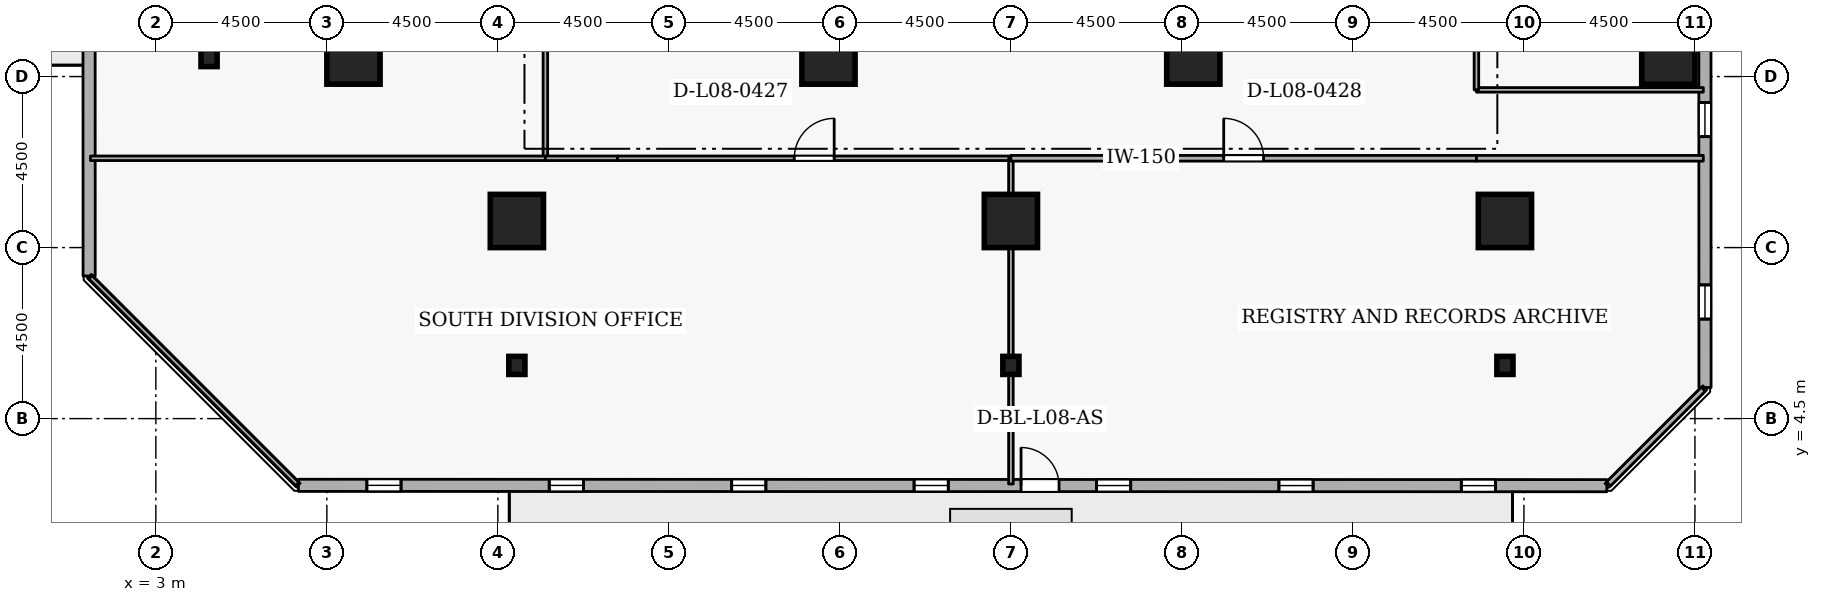
"""IFC4 building model, lengths in metres.
Left out: names, types, materials, properties, quantities, classifications, styles, units other than length and angle.
Written with IfcOpenShell. Run it as: python <this file> out.ifc"""

import sys

from ifc_helpers import new_model, si_unit, direction, frame, frame_2d, origin, origin_2d, place, context, subcontext, project, spatial, rectangle, i_section, extrude, element, fill, save


model = new_model("IFC4")
c1 = context("Model", 3, precision=1e-05, world=origin(), true_north=direction((0.0, 1.0)))
c2 = subcontext(c1, "Body", "Model", "MODEL_VIEW")
j1 = project(units=[si_unit("LENGTHUNIT", "METRE"), si_unit("PLANEANGLEUNIT", "RADIAN")], contexts=[c1])
p1 = place(None, origin())
s1 = spatial("IfcSite", under=j1, at=p1, CompositionType="ELEMENT")
p2 = place(p1, origin())
s2 = spatial("IfcBuilding", under=s1, at=p2, CompositionType="ELEMENT")
p3 = place(p2, frame((0.0, 0.0, 35.1)))
s3 = spatial("IfcBuildingStorey", under=s2, at=p3, CompositionType="ELEMENT", Elevation=35.1)
for number, where, z_axis, x_axis in (
    (1, (12.5, 9.7, 0.0), (0.0, 0.0, 1.0), (1.0, 0.0, 0.0)),
    (2, (25.5, 9.7, 0.0), (0.0, 0.0, 1.0), (1.0, 0.0, 0.0)),
    (3, (38.5, 9.7, 0.0), (0.0, 0.0, 1.0), (1.0, 0.0, 0.0)),
    (4, (42.8, 14.0, 0.0), (0.0, 0.0, 1.0), (1.0, 0.0, 0.0)),
    (5, (8.2, 14.0, 0.0), (0.0, 0.0, 1.0), (1.0, 0.0, 0.0)),
    (6, (20.7, 14.0, 0.0), (0.0, 0.0, 1.0), (1.0, 0.0, 0.0)),
    (7, (30.3, 14.0, 0.0), (0.0, 0.0, 1.0), (1.0, 0.0, 0.0)),
):
    element("IfcColumn", number, at=place(p3, frame(where, z_axis=z_axis, x_axis=x_axis)), inside=s3, PredefinedType="COLUMN", context=c2, shape_type="SweptSolid", body=[
        extrude(rectangle(XDim=1.4, YDim=1.4, at=origin_2d()), origin(), (0.0, 0.0, 1.0), 3.6),
    ])
for number, where, z_axis, x_axis in (
    (8, (12.5, 5.9, 0.0), (0.0, 0.0, 1.0), (1.0, 0.0, 0.0)),
    (9, (25.5, 5.9, 0.0), (0.0, 0.0, 1.0), (1.0, 0.0, 0.0)),
    (10, (38.5, 5.9, 0.0), (0.0, 0.0, 1.0), (1.0, 0.0, 0.0)),
    (11, (4.4, 14.0, 0.0), (0.0, 0.0, 1.0), (1.0, 0.0, 0.0)),
):
    element("IfcColumn", number, at=place(p3, frame(where, z_axis=z_axis, x_axis=x_axis)), inside=s3, PredefinedType="COLUMN", context=c2, shape_type="SweptSolid", body=[
        extrude(i_section(OverallWidth=0.424, OverallDepth=0.475, WebThickness=0.048, FlangeThickness=0.077, FilletRadius=0.015, at=origin_2d()), origin(), (0.0, 0.0, 1.0), 3.6),
    ])
p4 = place(p3, frame((6.752, 2.745, 0.0), z_axis=(0.0, 0.0, 1.0), x_axis=(0.999999961759, -0.000276554545, 0.0)))
e12 = element("IfcWall", 12, at=p4, inside=s3, PredefinedType="STANDARD", context=c2, shape_type="SweptSolid", body=[
    extrude(rectangle(XDim=34.429, YDim=0.32, at=frame_2d((17.214, 0.0))), origin(), (0.0, 0.0, 1.0), 2.7),
])
p5 = place(p4, frame((19.014, 0.0, 0.0)))
e13 = element("IfcOpeningElement", 13, at=p5, cuts=e12, PredefinedType="OPENING", context=c2, shape_type="SweptSolid", body=[
    extrude(rectangle(XDim=1.0, YDim=2.08, at=frame_2d((0.5, 1.04))), frame((0.0, 0.17, 0.0), z_axis=(0.0, -1.0, 0.0), x_axis=(1.0, 0.0, 0.0)), (0.0, 0.0, 1.0), 0.34),
])
p6 = place(p4, frame((1.8, 0.0, 0.72)))
e14 = element("IfcOpeningElement", 14, at=p6, cuts=e12, PredefinedType="OPENING", context=c2, shape_type="SweptSolid", body=[
    extrude(rectangle(XDim=0.9, YDim=1.75, at=frame_2d((0.45, 0.875))), frame((0.0, 0.17, 0.0), z_axis=(0.0, -1.0, 0.0), x_axis=(1.0, 0.0, 0.0)), (0.0, 0.0, 1.0), 0.34),
])
p7 = place(p4, frame((6.6, 0.0, 0.72)))
e15 = element("IfcOpeningElement", 15, at=p7, cuts=e12, PredefinedType="OPENING", context=c2, shape_type="SweptSolid", body=[
    extrude(rectangle(XDim=0.9, YDim=1.75, at=frame_2d((0.45, 0.875))), frame((0.0, 0.17, 0.0), z_axis=(0.0, -1.0, 0.0), x_axis=(1.0, 0.0, 0.0)), (0.0, 0.0, 1.0), 0.34),
])
p8 = place(p4, frame((11.4, 0.0, 0.72)))
e16 = element("IfcOpeningElement", 16, at=p8, cuts=e12, PredefinedType="OPENING", context=c2, shape_type="SweptSolid", body=[
    extrude(rectangle(XDim=0.9, YDim=1.75, at=frame_2d((0.45, 0.875))), frame((0.0, 0.17, 0.0), z_axis=(0.0, -1.0, 0.0), x_axis=(1.0, 0.0, 0.0)), (0.0, 0.0, 1.0), 0.34),
])
p9 = place(p4, frame((16.2, 0.0, 0.72)))
e17 = element("IfcOpeningElement", 17, at=p9, cuts=e12, PredefinedType="OPENING", context=c2, shape_type="SweptSolid", body=[
    extrude(rectangle(XDim=0.9, YDim=1.75, at=frame_2d((0.45, 0.875))), frame((0.0, 0.17, 0.0), z_axis=(0.0, -1.0, 0.0), x_axis=(1.0, 0.0, 0.0)), (0.0, 0.0, 1.0), 0.34),
])
p10 = place(p4, frame((21.0, 0.0, 0.72)))
e18 = element("IfcOpeningElement", 18, at=p10, cuts=e12, PredefinedType="OPENING", context=c2, shape_type="SweptSolid", body=[
    extrude(rectangle(XDim=0.9, YDim=1.75, at=frame_2d((0.45, 0.875))), frame((0.0, 0.17, 0.0), z_axis=(0.0, -1.0, 0.0), x_axis=(1.0, 0.0, 0.0)), (0.0, 0.0, 1.0), 0.34),
])
p11 = place(p4, frame((25.8, 0.0, 0.72)))
e19 = element("IfcOpeningElement", 19, at=p11, cuts=e12, PredefinedType="OPENING", context=c2, shape_type="SweptSolid", body=[
    extrude(rectangle(XDim=0.9, YDim=1.75, at=frame_2d((0.45, 0.875))), frame((0.0, 0.17, 0.0), z_axis=(0.0, -1.0, 0.0), x_axis=(1.0, 0.0, 0.0)), (0.0, 0.0, 1.0), 0.34),
])
p12 = place(p4, frame((30.6, 0.0, 0.72)))
e20 = element("IfcOpeningElement", 20, at=p12, cuts=e12, PredefinedType="OPENING", context=c2, shape_type="SweptSolid", body=[
    extrude(rectangle(XDim=0.9, YDim=1.75, at=frame_2d((0.45, 0.875))), frame((0.0, 0.17, 0.0), z_axis=(0.0, -1.0, 0.0), x_axis=(1.0, 0.0, 0.0)), (0.0, 0.0, 1.0), 0.34),
])
p13 = place(p3, frame((43.765, 5.319, 0.0), z_axis=(0.0, 0.0, 1.0), x_axis=(-0.000276554545, 0.999999961759, 0.0)))
e21 = element("IfcWall", 21, at=p13, inside=s3, PredefinedType="STANDARD", context=c2, shape_type="SweptSolid", body=[
    extrude(rectangle(XDim=34.429, YDim=0.32, at=frame_2d((17.214, 0.0))), origin(), (0.0, 0.0, 1.0), 2.7),
])
p14 = place(p13, frame((1.8, 0.0, 0.72)))
e22 = element("IfcOpeningElement", 22, at=p14, cuts=e21, PredefinedType="OPENING", context=c2, shape_type="SweptSolid", body=[
    extrude(rectangle(XDim=0.9, YDim=1.75, at=frame_2d((0.45, 0.875))), frame((0.0, 0.17, 0.0), z_axis=(0.0, -1.0, 0.0), x_axis=(1.0, 0.0, 0.0)), (0.0, 0.0, 1.0), 0.34),
])
p15 = place(p13, frame((6.6, 0.0, 0.72)))
e23 = element("IfcOpeningElement", 23, at=p15, cuts=e21, PredefinedType="OPENING", context=c2, shape_type="SweptSolid", body=[
    extrude(rectangle(XDim=0.9, YDim=1.75, at=frame_2d((0.45, 0.875))), frame((0.0, 0.17, 0.0), z_axis=(0.0, -1.0, 0.0), x_axis=(1.0, 0.0, 0.0)), (0.0, 0.0, 1.0), 0.34),
])
p16 = place(p13, frame((11.4, 0.0, 0.72)))
e24 = element("IfcOpeningElement", 24, at=p16, cuts=e21, PredefinedType="OPENING", context=c2, shape_type="SweptSolid", body=[
    extrude(rectangle(XDim=0.9, YDim=1.75, at=frame_2d((0.45, 0.875))), frame((0.0, 0.17, 0.0), z_axis=(0.0, -1.0, 0.0), x_axis=(1.0, 0.0, 0.0)), (0.0, 0.0, 1.0), 0.34),
])
p17 = place(p13, frame((16.2, 0.0, 0.72)))
e25 = element("IfcOpeningElement", 25, at=p17, cuts=e21, PredefinedType="OPENING", context=c2, shape_type="SweptSolid", body=[
    extrude(rectangle(XDim=0.9, YDim=1.75, at=frame_2d((0.45, 0.875))), frame((0.0, 0.17, 0.0), z_axis=(0.0, -1.0, 0.0), x_axis=(1.0, 0.0, 0.0)), (0.0, 0.0, 1.0), 0.34),
])
p18 = place(p13, frame((25.8, 0.0, 0.72)))
e26 = element("IfcOpeningElement", 26, at=p18, cuts=e21, PredefinedType="OPENING", context=c2, shape_type="SweptSolid", body=[
    extrude(rectangle(XDim=0.9, YDim=1.75, at=frame_2d((0.45, 0.875))), frame((0.0, 0.17, 0.0), z_axis=(0.0, -1.0, 0.0), x_axis=(1.0, 0.0, 0.0)), (0.0, 0.0, 1.0), 0.34),
])
p19 = place(p13, frame((30.6, 0.0, 0.72)))
e27 = element("IfcOpeningElement", 27, at=p19, cuts=e21, PredefinedType="OPENING", context=c2, shape_type="SweptSolid", body=[
    extrude(rectangle(XDim=0.9, YDim=1.75, at=frame_2d((0.45, 0.875))), frame((0.0, 0.17, 0.0), z_axis=(0.0, -1.0, 0.0), x_axis=(1.0, 0.0, 0.0)), (0.0, 0.0, 1.0), 0.34),
])
p20 = place(p3, frame((1.235, 42.681, 0.0), z_axis=(0.0, 0.0, 1.0), x_axis=(0.000276554545, -0.999999961759, 0.0)))
e28 = element("IfcWall", 28, at=p20, inside=s3, PredefinedType="STANDARD", context=c2, shape_type="SweptSolid", body=[
    extrude(rectangle(XDim=34.429, YDim=0.32, at=frame_2d((17.214, 0.0))), origin(), (0.0, 0.0, 1.0), 2.7),
])
p21 = place(p20, frame((19.014, 0.0, 0.0)))
e29 = element("IfcOpeningElement", 29, at=p21, cuts=e28, PredefinedType="OPENING", context=c2, shape_type="SweptSolid", body=[
    extrude(rectangle(XDim=1.0, YDim=2.08, at=frame_2d((0.5, 1.04))), frame((0.0, 0.17, 0.0), z_axis=(0.0, -1.0, 0.0), x_axis=(1.0, 0.0, 0.0)), (0.0, 0.0, 1.0), 0.34),
])
p22 = place(p20, frame((1.8, 0.0, 0.72)))
e30 = element("IfcOpeningElement", 30, at=p22, cuts=e28, PredefinedType="OPENING", context=c2, shape_type="SweptSolid", body=[
    extrude(rectangle(XDim=0.9, YDim=1.75, at=frame_2d((0.45, 0.875))), frame((0.0, 0.17, 0.0), z_axis=(0.0, -1.0, 0.0), x_axis=(1.0, 0.0, 0.0)), (0.0, 0.0, 1.0), 0.34),
])
p23 = place(p20, frame((6.6, 0.0, 0.72)))
e31 = element("IfcOpeningElement", 31, at=p23, cuts=e28, PredefinedType="OPENING", context=c2, shape_type="SweptSolid", body=[
    extrude(rectangle(XDim=0.9, YDim=1.75, at=frame_2d((0.45, 0.875))), frame((0.0, 0.17, 0.0), z_axis=(0.0, -1.0, 0.0), x_axis=(1.0, 0.0, 0.0)), (0.0, 0.0, 1.0), 0.34),
])
p24 = place(p20, frame((11.4, 0.0, 0.72)))
e32 = element("IfcOpeningElement", 32, at=p24, cuts=e28, PredefinedType="OPENING", context=c2, shape_type="SweptSolid", body=[
    extrude(rectangle(XDim=0.9, YDim=1.75, at=frame_2d((0.45, 0.875))), frame((0.0, 0.17, 0.0), z_axis=(0.0, -1.0, 0.0), x_axis=(1.0, 0.0, 0.0)), (0.0, 0.0, 1.0), 0.34),
])
p25 = place(p20, frame((16.2, 0.0, 0.72)))
e33 = element("IfcOpeningElement", 33, at=p25, cuts=e28, PredefinedType="OPENING", context=c2, shape_type="SweptSolid", body=[
    extrude(rectangle(XDim=0.9, YDim=1.75, at=frame_2d((0.45, 0.875))), frame((0.0, 0.17, 0.0), z_axis=(0.0, -1.0, 0.0), x_axis=(1.0, 0.0, 0.0)), (0.0, 0.0, 1.0), 0.34),
])
p26 = place(p20, frame((21.0, 0.0, 0.72)))
e34 = element("IfcOpeningElement", 34, at=p26, cuts=e28, PredefinedType="OPENING", context=c2, shape_type="SweptSolid", body=[
    extrude(rectangle(XDim=0.9, YDim=1.75, at=frame_2d((0.45, 0.875))), frame((0.0, 0.17, 0.0), z_axis=(0.0, -1.0, 0.0), x_axis=(1.0, 0.0, 0.0)), (0.0, 0.0, 1.0), 0.34),
])
p27 = place(p20, frame((25.8, 0.0, 0.72)))
e35 = element("IfcOpeningElement", 35, at=p27, cuts=e28, PredefinedType="OPENING", context=c2, shape_type="SweptSolid", body=[
    extrude(rectangle(XDim=0.9, YDim=1.75, at=frame_2d((0.45, 0.875))), frame((0.0, 0.17, 0.0), z_axis=(0.0, -1.0, 0.0), x_axis=(1.0, 0.0, 0.0)), (0.0, 0.0, 1.0), 0.34),
])
p28 = place(p3, frame((13.25, 20.7, 0.0), z_axis=(0.0, 0.0, 1.0), x_axis=(0.0, -1.0, 0.0)))
e36 = element("IfcWall", 36, at=p28, inside=s3, PredefinedType="PARTITIONING", context=c2, shape_type="SweptSolid", body=[
    extrude(rectangle(XDim=9.35, YDim=0.12, at=frame_2d((4.675, 0.0))), origin(), (0.0, 0.0, 1.0), 3.34),
])
p29 = place(p28, frame((4.15, 0.0, 0.0)))
e37 = element("IfcOpeningElement", 37, at=p29, cuts=e36, PredefinedType="OPENING", context=c2, shape_type="SweptSolid", body=[
    extrude(rectangle(XDim=1.05, YDim=2.1, at=frame_2d((0.525, 1.05))), frame((0.0, 0.07, 0.0), z_axis=(0.0, -1.0, 0.0), x_axis=(1.0, 0.0, 0.0)), (0.0, 0.0, 1.0), 0.14),
])
p30 = place(p3, frame((13.25, 11.35, 0.0), z_axis=(0.0, 0.0, 1.0), x_axis=(-1.0, 0.0, 0.0)))
e38 = element("IfcWall", 38, at=p30, inside=s3, PredefinedType="PARTITIONING", context=c2, shape_type="SweptSolid", body=[
    extrude(rectangle(XDim=11.97, YDim=0.12, at=frame_2d((5.985, 0.0))), origin(), (0.0, 0.0, 1.0), 3.34),
])
p31 = place(p3, frame((43.72, 13.15, 0.0), z_axis=(0.0, 0.0, 1.0), x_axis=(-1.0, 0.0, 0.0)))
e39 = element("IfcWall", 39, at=p31, inside=s3, PredefinedType="PARTITIONING", context=c2, shape_type="SweptSolid", body=[
    extrude(rectangle(XDim=5.97, YDim=0.12, at=frame_2d((2.985, 0.0))), origin(), (0.0, 0.0, 1.0), 3.34),
])
p32 = place(p3, frame((37.75, 13.15, 0.0), z_axis=(0.0, 0.0, 1.0), x_axis=(0.0, 1.0, 0.0)))
e40 = element("IfcWall", 40, at=p32, inside=s3, PredefinedType="PARTITIONING", context=c2, shape_type="SweptSolid", body=[
    extrude(rectangle(XDim=1.862, YDim=0.12, at=frame_2d((0.931, 0.0))), origin(), (0.0, 0.0, 1.0), 3.34),
])
p33 = place(p3, frame((6.719, 2.78, 0.0), z_axis=(0.0, 0.0, 1.0), x_axis=(-0.707106781187, 0.707106781187, 0.0)))
e41 = element("IfcWall", 41, at=p33, inside=s3, PredefinedType="PARTITIONING", context=c2, shape_type="SweptSolid", body=[
    extrude(rectangle(XDim=7.693, YDim=0.12, at=frame_2d((3.846, 0.0))), origin(), (0.0, 0.0, 1.0), 3.34),
])
p34 = place(p3, frame((13.25, 11.35, 0.0), z_axis=(0.0, 0.0, 1.0), x_axis=(1.0, 0.0, 0.0)))
e42 = element("IfcWall", 42, at=p34, inside=s3, PredefinedType="PARTITIONING", context=c2, shape_type="SweptSolid", body=[
    extrude(rectangle(XDim=1.9, YDim=0.12, at=frame_2d((0.95, 0.0))), origin(), (0.0, 0.0, 1.0), 3.34),
])
p35 = place(p3, frame((15.15, 11.35, 0.0), z_axis=(0.0, 0.0, 1.0), x_axis=(1.0, 0.0, 0.0)))
e43 = element("IfcWall", 43, at=p35, inside=s3, PredefinedType="PARTITIONING", context=c2, shape_type="SweptSolid", body=[
    extrude(rectangle(XDim=10.35, YDim=0.12, at=frame_2d((5.175, 0.0))), origin(), (0.0, 0.0, 1.0), 3.34),
])
p36 = place(p35, frame((4.65, 0.0, 0.0)))
e44 = element("IfcOpeningElement", 44, at=p36, cuts=e43, PredefinedType="OPENING", context=c2, shape_type="SweptSolid", body=[
    extrude(rectangle(XDim=1.05, YDim=2.1, at=frame_2d((0.525, 1.05))), frame((0.0, 0.07, 0.0), z_axis=(0.0, -1.0, 0.0), x_axis=(1.0, 0.0, 0.0)), (0.0, 0.0, 1.0), 0.14),
])
p37 = place(p3, frame((25.5, 11.35, 0.0), z_axis=(0.0, 0.0, 1.0), x_axis=(0.0, -1.0, 0.0)))
e45 = element("IfcWall", 45, at=p37, inside=s3, PredefinedType="PARTITIONING", context=c2, shape_type="SweptSolid", body=[
    extrude(rectangle(XDim=8.57, YDim=0.12, at=frame_2d((4.285, 0.0))), origin(), (0.0, 0.0, 1.0), 2.878),
])
p38 = place(p3, frame((25.5, 11.35, 0.0), z_axis=(0.0, 0.0, 1.0), x_axis=(1.0, 0.0, 0.0)))
e46 = element("IfcWall", 46, at=p38, inside=s3, PredefinedType="PARTITIONING", context=c2, shape_type="SweptSolid", body=[
    extrude(rectangle(XDim=12.25, YDim=0.15, at=frame_2d((6.125, 0.0))), origin(), (0.0, 0.0, 1.0), 3.34),
])
p39 = place(p38, frame((5.6, 0.0, 0.0)))
e47 = element("IfcOpeningElement", 47, at=p39, cuts=e46, PredefinedType="OPENING", context=c2, shape_type="SweptSolid", body=[
    extrude(rectangle(XDim=1.05, YDim=2.1, at=frame_2d((0.525, 1.05))), frame((0.0, 0.085, 0.0), z_axis=(0.0, -1.0, 0.0), x_axis=(1.0, 0.0, 0.0)), (0.0, 0.0, 1.0), 0.17),
])
p40 = place(p3, frame((37.75, 11.35, 0.0), z_axis=(0.0, 0.0, 1.0), x_axis=(1.0, 0.0, 0.0)))
e48 = element("IfcWall", 48, at=p40, inside=s3, PredefinedType="PARTITIONING", context=c2, shape_type="SweptSolid", body=[
    extrude(rectangle(XDim=5.97, YDim=0.15, at=frame_2d((2.985, 0.0))), origin(), (0.0, 0.0, 1.0), 3.34),
])
p41 = place(p3, frame((43.72, 5.275, 0.0), z_axis=(0.0, 0.0, 1.0), x_axis=(-0.707106781187, -0.707106781187, 0.0)))
e49 = element("IfcWall", 49, at=p41, inside=s3, PredefinedType="PARTITIONING", context=c2, shape_type="SweptSolid", body=[
    extrude(rectangle(XDim=3.528, YDim=0.15, at=frame_2d((1.764, 0.0))), origin(), (0.0, 0.0, 1.0), 3.34),
])
p42 = place(p5, origin())
e50 = element("IfcDoor", 50, at=p42, inside=s3, OperationType="SINGLE_SWING_LEFT", PredefinedType="DOOR", context=c2, shape_type="SweptSolid", body=[
    extrude(rectangle(XDim=1.0, YDim=2.08, at=frame_2d((0.5, 1.04))), frame((0.0, 0.025, 0.0), z_axis=(0.0, -1.0, 0.0), x_axis=(1.0, 0.0, 0.0)), (0.0, 0.0, 1.0), 0.05),
])
fill(e13, e50)
p43 = place(p6, origin())
e51 = element("IfcWindow", 51, at=p43, inside=s3, PartitioningType="SINGLE_PANEL", PredefinedType="WINDOW", context=c2, shape_type="SweptSolid", body=[
    extrude(rectangle(XDim=0.9, YDim=1.75, at=frame_2d((0.45, 0.875))), frame((0.0, 0.03, 0.0), z_axis=(0.0, -1.0, 0.0), x_axis=(1.0, 0.0, 0.0)), (0.0, 0.0, 1.0), 0.06),
])
fill(e14, e51)
p44 = place(p7, origin())
e52 = element("IfcWindow", 52, at=p44, inside=s3, PartitioningType="SINGLE_PANEL", PredefinedType="WINDOW", context=c2, shape_type="SweptSolid", body=[
    extrude(rectangle(XDim=0.9, YDim=1.75, at=frame_2d((0.45, 0.875))), frame((0.0, 0.03, 0.0), z_axis=(0.0, -1.0, 0.0), x_axis=(1.0, 0.0, 0.0)), (0.0, 0.0, 1.0), 0.06),
])
fill(e15, e52)
p45 = place(p8, origin())
e53 = element("IfcWindow", 53, at=p45, inside=s3, PartitioningType="SINGLE_PANEL", PredefinedType="WINDOW", context=c2, shape_type="SweptSolid", body=[
    extrude(rectangle(XDim=0.9, YDim=1.75, at=frame_2d((0.45, 0.875))), frame((0.0, 0.03, 0.0), z_axis=(0.0, -1.0, 0.0), x_axis=(1.0, 0.0, 0.0)), (0.0, 0.0, 1.0), 0.06),
])
fill(e16, e53)
p46 = place(p9, origin())
e54 = element("IfcWindow", 54, at=p46, inside=s3, PartitioningType="SINGLE_PANEL", PredefinedType="WINDOW", context=c2, shape_type="SweptSolid", body=[
    extrude(rectangle(XDim=0.9, YDim=1.75, at=frame_2d((0.45, 0.875))), frame((0.0, 0.03, 0.0), z_axis=(0.0, -1.0, 0.0), x_axis=(1.0, 0.0, 0.0)), (0.0, 0.0, 1.0), 0.06),
])
fill(e17, e54)
p47 = place(p10, origin())
e55 = element("IfcWindow", 55, at=p47, inside=s3, PartitioningType="SINGLE_PANEL", PredefinedType="WINDOW", context=c2, shape_type="SweptSolid", body=[
    extrude(rectangle(XDim=0.9, YDim=1.75, at=frame_2d((0.45, 0.875))), frame((0.0, 0.03, 0.0), z_axis=(0.0, -1.0, 0.0), x_axis=(1.0, 0.0, 0.0)), (0.0, 0.0, 1.0), 0.06),
])
fill(e18, e55)
p48 = place(p11, origin())
e56 = element("IfcWindow", 56, at=p48, inside=s3, PartitioningType="SINGLE_PANEL", PredefinedType="WINDOW", context=c2, shape_type="SweptSolid", body=[
    extrude(rectangle(XDim=0.9, YDim=1.75, at=frame_2d((0.45, 0.875))), frame((0.0, 0.03, 0.0), z_axis=(0.0, -1.0, 0.0), x_axis=(1.0, 0.0, 0.0)), (0.0, 0.0, 1.0), 0.06),
])
fill(e19, e56)
p49 = place(p12, origin())
e57 = element("IfcWindow", 57, at=p49, inside=s3, PartitioningType="SINGLE_PANEL", PredefinedType="WINDOW", context=c2, shape_type="SweptSolid", body=[
    extrude(rectangle(XDim=0.9, YDim=1.75, at=frame_2d((0.45, 0.875))), frame((0.0, 0.03, 0.0), z_axis=(0.0, -1.0, 0.0), x_axis=(1.0, 0.0, 0.0)), (0.0, 0.0, 1.0), 0.06),
])
fill(e20, e57)
p50 = place(p14, origin())
e58 = element("IfcWindow", 58, at=p50, inside=s3, PartitioningType="SINGLE_PANEL", PredefinedType="WINDOW", context=c2, shape_type="SweptSolid", body=[
    extrude(rectangle(XDim=0.9, YDim=1.75, at=frame_2d((0.45, 0.875))), frame((0.0, 0.03, 0.0), z_axis=(0.0, -1.0, 0.0), x_axis=(1.0, 0.0, 0.0)), (0.0, 0.0, 1.0), 0.06),
])
fill(e22, e58)
p51 = place(p15, origin())
e59 = element("IfcWindow", 59, at=p51, inside=s3, PartitioningType="SINGLE_PANEL", PredefinedType="WINDOW", context=c2, shape_type="SweptSolid", body=[
    extrude(rectangle(XDim=0.9, YDim=1.75, at=frame_2d((0.45, 0.875))), frame((0.0, 0.03, 0.0), z_axis=(0.0, -1.0, 0.0), x_axis=(1.0, 0.0, 0.0)), (0.0, 0.0, 1.0), 0.06),
])
fill(e23, e59)
p52 = place(p36, origin())
e60 = element("IfcDoor", 60, at=p52, inside=s3, OperationType="SINGLE_SWING_RIGHT", PredefinedType="DOOR", context=c2, shape_type="SweptSolid", body=[
    extrude(rectangle(XDim=1.05, YDim=2.1, at=frame_2d((0.525, 1.05))), frame((0.0, 0.025, 0.0), z_axis=(0.0, -1.0, 0.0), x_axis=(1.0, 0.0, 0.0)), (0.0, 0.0, 1.0), 0.05),
])
fill(e44, e60)
p53 = place(p39, origin())
e61 = element("IfcDoor", 61, at=p53, inside=s3, OperationType="SINGLE_SWING_LEFT", PredefinedType="DOOR", context=c2, shape_type="SweptSolid", body=[
    extrude(rectangle(XDim=1.05, YDim=2.1, at=frame_2d((0.525, 1.05))), frame((0.0, 0.025, 0.0), z_axis=(0.0, -1.0, 0.0), x_axis=(1.0, 0.0, 0.0)), (0.0, 0.0, 1.0), 0.05),
])
fill(e47, e61)
save(model, sys.argv[1])
